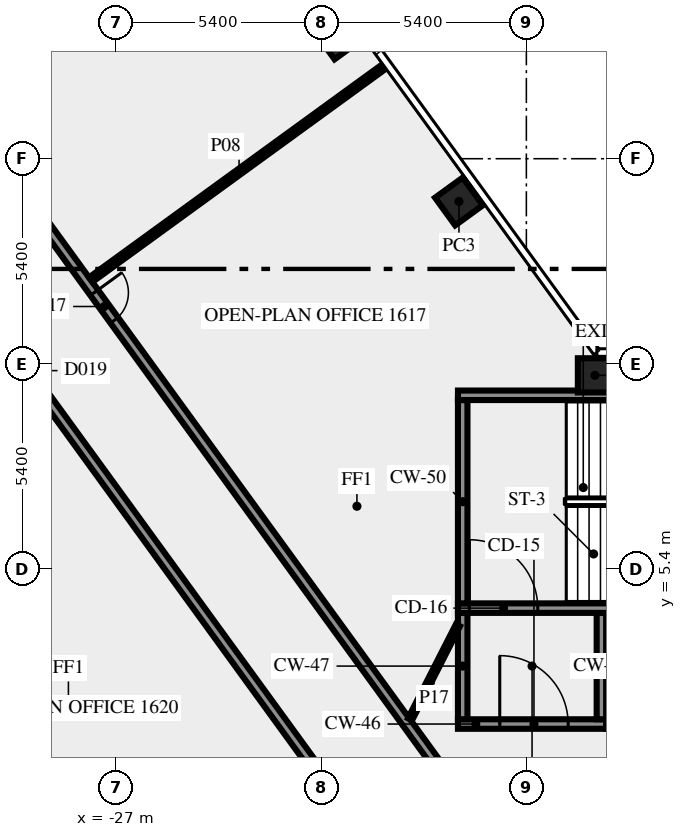
"""IFC4 building model, lengths in metres.
Left out: names, types, materials, properties, quantities, classifications, styles, units other than length and angle.
Written with IfcOpenShell. Run it as: python <this file> out.ifc"""

import sys

from ifc_helpers import new_model, si_unit, direction, frame, frame_2d, origin, origin_2d, place, context, subcontext, project, spatial, rectangle, extrude, element, fill, save


model = new_model("IFC4")
c1 = context("Model", 3, precision=1e-05, world=origin(), true_north=direction((0.0, 1.0)))
c2 = subcontext(c1, "Body", "Model", "MODEL_VIEW")
j1 = project(units=[si_unit("LENGTHUNIT", "METRE"), si_unit("PLANEANGLEUNIT", "RADIAN")], contexts=[c1])
p1 = place(None, origin())
s1 = spatial("IfcSite", under=j1, at=p1, CompositionType="ELEMENT")
p2 = place(p1, origin())
s2 = spatial("IfcBuilding", under=s1, at=p2, CompositionType="ELEMENT")
p3 = place(p2, frame((0.0, 0.0, 71.0)))
s3 = spatial("IfcBuildingStorey", under=s2, at=p3, CompositionType="ELEMENT", Elevation=71.0)
for number, where, z_axis, x_axis in (
    (1, (-17.974, 15.075, 0.0), (0.0, 0.0, 1.0), (-0.588, 0.809, 0.0)),
    (2, (-21.147, 19.444, 0.0), (0.0, 0.0, 1.0), (-0.588, 0.809, 0.0)),
    (3, (-14.395, 10.5, 0.0), (0.0, 0.0, 1.0), (-1.0, 0.0, 0.0)),
):
    element("IfcColumn", number, at=place(p3, frame(where, z_axis=z_axis, x_axis=x_axis)), inside=s3, PredefinedType="COLUMN", context=c2, shape_type="SweptSolid", body=[
        extrude(rectangle(XDim=0.9, YDim=0.9, at=origin_2d()), origin(), (0.0, 0.0, 1.0), 3.65),
    ])
p4 = place(p3, frame((-18.0, 1.325, 0.0), z_axis=(0.0, 0.0, 1.0), x_axis=(1.0, 0.0, 0.0)))
e4 = element("IfcWall", 4, at=p4, inside=s3, PredefinedType="SHEAR", context=c2, shape_type="SweptSolid", body=[
    extrude(rectangle(XDim=3.9, YDim=0.25, at=frame_2d((1.95, 0.0))), origin(), (0.0, 0.0, 1.0), 3.65),
])
p5 = place(p4, frame((1.1, 0.0, 0.0)))
e5 = element("IfcOpeningElement", 5, at=p5, cuts=e4, PredefinedType="OPENING", context=c2, shape_type="SweptSolid", body=[
    extrude(rectangle(XDim=1.8, YDim=2.1, at=frame_2d((0.9, 1.05))), frame((0.0, 0.135, 0.0), z_axis=(0.0, -1.0, 0.0), x_axis=(1.0, 0.0, 0.0)), (0.0, 0.0, 1.0), 0.27),
])
for number, where, z_axis, x_axis in (
    (6, (-17.875, 1.45, 0.0), (0.0, 0.0, 1.0), (0.0, 1.0, 0.0)),
    (7, (-14.225, 1.45, 0.0), (0.0, 0.0, 1.0), (0.0, 1.0, 0.0)),
):
    element("IfcWall", number, at=place(p3, frame(where, z_axis=z_axis, x_axis=x_axis)), inside=s3, PredefinedType="SHEAR", context=c2, shape_type="SweptSolid", body=[
        extrude(rectangle(XDim=2.8, YDim=0.25, at=frame_2d((1.4, 0.0))), origin(), (0.0, 0.0, 1.0), 3.65),
    ])
p6 = place(p3, frame((-18.0, 4.375, 0.0), z_axis=(0.0, 0.0, 1.0), x_axis=(1.0, 0.0, 0.0)))
e8 = element("IfcWall", 8, at=p6, inside=s3, PredefinedType="SHEAR", context=c2, shape_type="SweptSolid", body=[
    extrude(rectangle(XDim=10.5, YDim=0.25, at=frame_2d((5.25, 0.0))), origin(), (0.0, 0.0, 1.0), 3.65),
])
p7 = place(p6, frame((0.3, 0.0, 0.0)))
e9 = element("IfcOpeningElement", 9, at=p7, cuts=e8, PredefinedType="OPENING", context=c2, shape_type="SweptSolid", body=[
    extrude(rectangle(XDim=1.8, YDim=2.1, at=frame_2d((0.9, 1.05))), frame((0.0, 0.135, 0.0), z_axis=(0.0, -1.0, 0.0), x_axis=(1.0, 0.0, 0.0)), (0.0, 0.0, 1.0), 0.27),
])
p8 = place(p3, frame((-17.875, 4.5, 0.0), z_axis=(0.0, 0.0, 1.0), x_axis=(0.0, 1.0, 0.0)))
e10 = element("IfcWall", 10, at=p8, inside=s3, PredefinedType="SHEAR", context=c2, shape_type="SweptSolid", body=[
    extrude(rectangle(XDim=5.35, YDim=0.25, at=frame_2d((2.675, 0.0))), origin(), (0.0, 0.0, 1.0), 3.65),
])
p9 = place(p3, frame((-18.0, 9.975, 0.0), z_axis=(0.0, 0.0, 1.0), x_axis=(1.0, 0.0, 0.0)))
e11 = element("IfcWall", 11, at=p9, inside=s3, PredefinedType="SHEAR", context=c2, shape_type="SweptSolid", body=[
    extrude(rectangle(XDim=10.5, YDim=0.25, at=frame_2d((5.25, 0.0))), origin(), (0.0, 0.0, 1.0), 3.65),
])
p10 = place(p9, frame((4.5, 0.0, 1.0)))
e12 = element("IfcOpeningElement", 12, at=p10, cuts=e11, PredefinedType="OPENING", context=c2, shape_type="SweptSolid", body=[
    extrude(rectangle(XDim=1.2, YDim=1.2, at=frame_2d((0.6, 0.6))), frame((0.0, 0.135, 0.0), z_axis=(0.0, -1.0, 0.0), x_axis=(1.0, 0.0, 0.0)), (0.0, 0.0, 1.0), 0.27),
])
p11 = place(p3, frame((-20.531, -1.523, 0.0), z_axis=(0.0, 0.0, 1.0), x_axis=(-0.587784593204, 0.809017473231, 0.0)))
e13 = element("IfcWall", 13, at=p11, inside=s3, PredefinedType="SOLIDWALL", context=c2, shape_type="SweptSolid", body=[
    extrude(rectangle(XDim=44.67, YDim=0.25, at=frame_2d((22.335, 0.0))), origin(), (0.0, 0.0, 1.0), 3.65),
])
p12 = place(p11, frame((0.533, 0.0, 0.0)))
e14 = element("IfcOpeningElement", 14, at=p12, cuts=e13, PredefinedType="OPENING", context=c2, shape_type="SweptSolid", body=[
    extrude(rectangle(XDim=0.9, YDim=2.1, at=frame_2d((0.45, 1.05))), frame((0.0, 0.135, 0.0), z_axis=(0.0, -1.0, 0.0), x_axis=(1.0, 0.0, 0.0)), (0.0, 0.0, 1.0), 0.27),
])
p13 = place(p11, frame((32.531, 0.0, 0.0)))
e15 = element("IfcOpeningElement", 15, at=p13, cuts=e13, PredefinedType="OPENING", context=c2, shape_type="SweptSolid", body=[
    extrude(rectangle(XDim=1.8, YDim=2.1, at=frame_2d((0.9, 1.05))), frame((0.0, 0.135, 0.0), z_axis=(0.0, -1.0, 0.0), x_axis=(1.0, 0.0, 0.0)), (0.0, 0.0, 1.0), 0.27),
])
p14 = place(p11, frame((14.566, 0.0, 0.0)))
e16 = element("IfcOpeningElement", 16, at=p14, cuts=e13, PredefinedType="OPENING", context=c2, shape_type="SweptSolid", body=[
    extrude(rectangle(XDim=0.9, YDim=2.1, at=frame_2d((0.45, 1.05))), frame((0.0, 0.135, 0.0), z_axis=(0.0, -1.0, 0.0), x_axis=(1.0, 0.0, 0.0)), (0.0, 0.0, 1.0), 0.27),
])
p15 = place(p3, frame((-37.232, 25.972, 0.0), z_axis=(0.0, 0.0, 1.0), x_axis=(0.587786323093, -0.809016216391, 0.0)))
e17 = element("IfcWall", 17, at=p15, inside=s3, PredefinedType="SOLIDWALL", context=c2, shape_type="SweptSolid", body=[
    extrude(rectangle(XDim=33.493, YDim=0.25, at=frame_2d((16.747, 0.0))), origin(), (0.0, 0.0, 1.0), 3.65),
])
p16 = place(p15, frame((16.435, 0.0, 0.0)))
e18 = element("IfcOpeningElement", 18, at=p16, cuts=e17, PredefinedType="OPENING", context=c2, shape_type="SweptSolid", body=[
    extrude(rectangle(XDim=0.9, YDim=2.1, at=frame_2d((0.45, 1.05))), frame((0.0, 0.135, 0.0), z_axis=(0.0, -1.0, 0.0), x_axis=(1.0, 0.0, 0.0)), (0.0, 0.0, 1.0), 0.27),
])
p17 = place(p15, frame((7.137, 0.0, 0.0)))
e19 = element("IfcOpeningElement", 19, at=p17, cuts=e17, PredefinedType="OPENING", context=c2, shape_type="SweptSolid", body=[
    extrude(rectangle(XDim=1.8, YDim=2.1, at=frame_2d((0.9, 1.05))), frame((0.0, 0.135, 0.0), z_axis=(0.0, -1.0, 0.0), x_axis=(1.0, 0.0, 0.0)), (0.0, 0.0, 1.0), 0.27),
])
p18 = place(p3, frame((-19.857, 18.689, 0.0), z_axis=(0.0, 0.0, 1.0), x_axis=(-0.809002920164, -0.587804623294, 0.0)))
e20 = element("IfcWall", 20, at=p18, inside=s3, PredefinedType="PARTITIONING", context=c2, shape_type="SweptSolid", body=[
    extrude(rectangle(XDim=9.651, YDim=0.15, at=frame_2d((4.825, 0.0))), origin(), (0.0, 0.0, 1.0), 2.75),
])
p19 = place(p3, frame((-19.261, 1.45, 0.0), z_axis=(0.0, 0.0, 1.0), x_axis=(0.453950796792, 0.891026752736, 0.0)))
e21 = element("IfcWall", 21, at=p19, inside=s3, PredefinedType="PARTITIONING", context=c2, shape_type="SweptSolid", body=[
    extrude(rectangle(XDim=2.778, YDim=0.12, at=frame_2d((1.389, 0.0))), origin(), (0.0, 0.0, 1.0), 3.65),
])
p20 = place(p5, origin())
e22 = element("IfcDoor", 22, at=p20, inside=s3, OperationType="DOUBLE_DOOR_SINGLE_SWING", PredefinedType="DOOR", context=c2, shape_type="SweptSolid", body=[
    extrude(rectangle(XDim=1.8, YDim=2.1, at=frame_2d((0.9, 1.05))), frame((0.0, 0.025, 0.0), z_axis=(0.0, -1.0, 0.0), x_axis=(1.0, 0.0, 0.0)), (0.0, 0.0, 1.0), 0.05),
])
fill(e5, e22)
p21 = place(p7, origin())
e23 = element("IfcDoor", 23, at=p21, inside=s3, OperationType="DOUBLE_DOOR_SINGLE_SWING", PredefinedType="DOOR", context=c2, shape_type="SweptSolid", body=[
    extrude(rectangle(XDim=1.8, YDim=2.1, at=frame_2d((0.9, 1.05))), frame((0.0, 0.025, 0.0), z_axis=(0.0, -1.0, 0.0), x_axis=(1.0, 0.0, 0.0)), (0.0, 0.0, 1.0), 0.05),
])
fill(e9, e23)
p22 = place(p16, origin())
e24 = element("IfcDoor", 24, at=p22, inside=s3, OperationType="SINGLE_SWING_LEFT", PredefinedType="DOOR", context=c2, shape_type="SweptSolid", body=[
    extrude(rectangle(XDim=0.9, YDim=2.1, at=frame_2d((0.45, 1.05))), frame((0.0, 0.025, 0.0), z_axis=(0.0, -1.0, 0.0), x_axis=(1.0, 0.0, 0.0)), (0.0, 0.0, 1.0), 0.05),
])
fill(e18, e24)
save(model, sys.argv[1])
